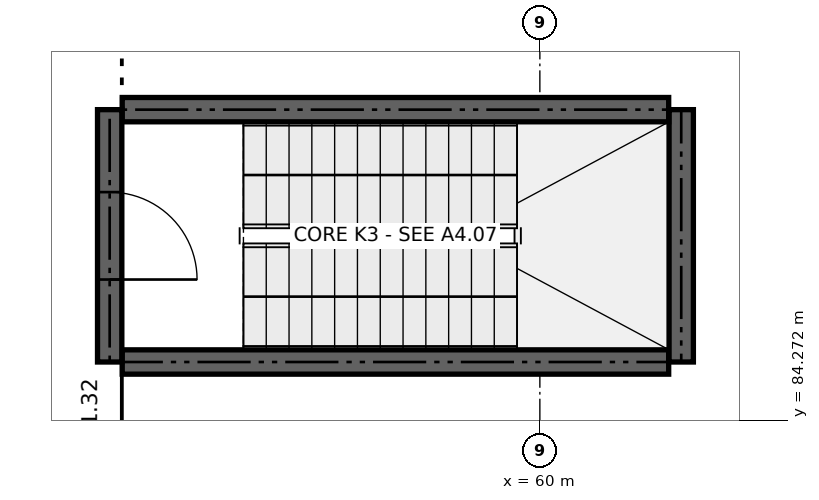
"""IFC4 building model, lengths in metres.
Left out: names, types, materials, properties, quantities, classifications, styles, units other than length and angle.
Written with IfcOpenShell. Run it as: python <this file> out.ifc"""

import sys

from ifc_helpers import new_model, si_unit, direction, frame, frame_2d, origin, place, context, subcontext, project, spatial, rectangle, extrude, element, fill, save


model = new_model("IFC4")
c1 = context("Model", 3, precision=1e-05, world=origin(), true_north=direction((0.0, 1.0)))
c2 = subcontext(c1, "Body", "Model", "MODEL_VIEW")
j1 = project(units=[si_unit("LENGTHUNIT", "METRE"), si_unit("PLANEANGLEUNIT", "RADIAN")], contexts=[c1])
p1 = place(None, origin())
s1 = spatial("IfcSite", under=j1, at=p1, CompositionType="ELEMENT")
p2 = place(p1, origin())
s2 = spatial("IfcBuilding", under=s1, at=p2, CompositionType="ELEMENT")
p3 = place(p2, frame((0.0, 0.0, 5.0)))
s3 = spatial("IfcBuildingStorey", under=s2, at=p3, CompositionType="ELEMENT", Elevation=5.0)
p4 = place(p3, frame((54.505, 85.04, 0.0), z_axis=(0.0, 0.0, 1.0), x_axis=(1.0, 0.0, 0.0)))
e1 = element("IfcWall", 1, at=p4, inside=s3, PredefinedType="SHEAR", context=c2, shape_type="SweptSolid", body=[
    extrude(rectangle(XDim=7.19, YDim=0.32, at=frame_2d((3.595, 0.0))), origin(), (0.0, 0.0, 1.0), 4.2),
])
p5 = place(p3, frame((61.86, 85.04, 0.0), z_axis=(0.0, 0.0, 1.0), x_axis=(0.0, 1.0, 0.0)))
e2 = element("IfcWall", 2, at=p5, inside=s3, PredefinedType="SHEAR", context=c2, shape_type="SweptSolid", body=[
    extrude(rectangle(XDim=3.32, YDim=0.32, at=frame_2d((1.66, 0.0))), origin(), (0.0, 0.0, 1.0), 4.2),
])
p6 = place(p3, frame((61.695, 88.36, 0.0), z_axis=(0.0, 0.0, 1.0), x_axis=(-1.0, 0.0, 0.0)))
e3 = element("IfcWall", 3, at=p6, inside=s3, PredefinedType="SHEAR", context=c2, shape_type="SweptSolid", body=[
    extrude(rectangle(XDim=7.19, YDim=0.32, at=frame_2d((3.595, 0.0))), origin(), (0.0, 0.0, 1.0), 4.2),
])
p7 = place(p3, frame((54.34, 88.36, 0.0), z_axis=(0.0, 0.0, 1.0), x_axis=(0.0, -1.0, 0.0)))
e4 = element("IfcWall", 4, at=p7, inside=s3, PredefinedType="SHEAR", context=c2, shape_type="SweptSolid", body=[
    extrude(rectangle(XDim=3.32, YDim=0.32, at=frame_2d((1.66, 0.0))), origin(), (0.0, 0.0, 1.0), 4.2),
])
p8 = place(p7, frame((1.085, 0.0, 0.0)))
e5 = element("IfcOpeningElement", 5, at=p8, cuts=e4, PredefinedType="OPENING", context=c2, shape_type="SweptSolid", body=[
    extrude(rectangle(XDim=1.15, YDim=2.15, at=frame_2d((0.575, 1.075))), frame((0.0, 0.172, 0.0), z_axis=(0.0, -1.0, 0.0), x_axis=(1.0, 0.0, 0.0)), (0.0, 0.0, 1.0), 0.344),
])
p9 = place(p8, origin())
e6 = element("IfcDoor", 6, at=p9, inside=s3, OperationType="SINGLE_SWING_RIGHT", PredefinedType="DOOR", context=c2, shape_type="SweptSolid", body=[
    extrude(rectangle(XDim=1.15, YDim=2.15, at=frame_2d((0.575, 1.075))), frame((0.0, 0.025, 0.0), z_axis=(0.0, -1.0, 0.0), x_axis=(1.0, 0.0, 0.0)), (0.0, 0.0, 1.0), 0.05),
])
fill(e5, e6)
save(model, sys.argv[1])
